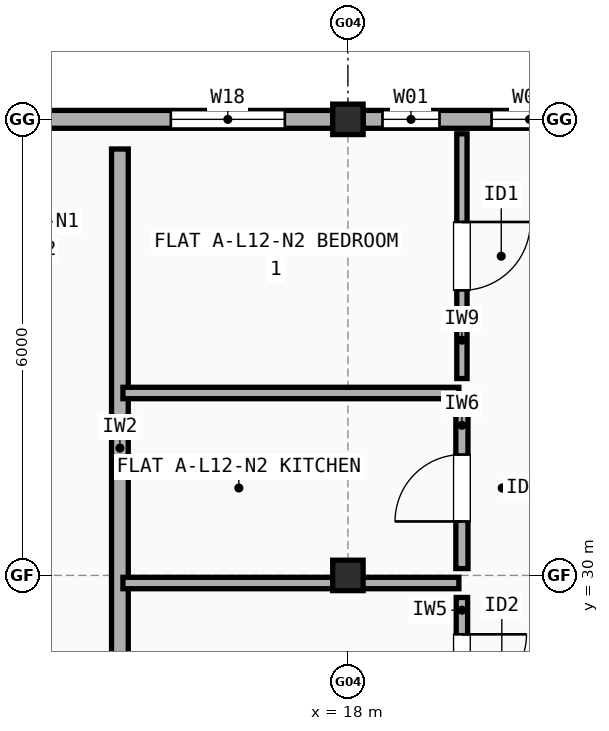
"""IFC4 building model, lengths in metres.
Left out: names, types, materials, properties, quantities, classifications, styles, units other than length and angle.
Written with IfcOpenShell. Run it as: python <this file> out.ifc"""

import sys

from ifc_helpers import new_model, si_unit, direction, frame, frame_2d, origin, origin_2d, place, context, subcontext, project, spatial, rectangle, extrude, element, fill, save


model = new_model("IFC4")
c1 = context("Model", 3, precision=1e-05, world=origin(), true_north=direction((0.0, 1.0)))
c2 = subcontext(c1, "Body", "Model", "MODEL_VIEW")
j1 = project(units=[si_unit("LENGTHUNIT", "METRE"), si_unit("PLANEANGLEUNIT", "RADIAN")], contexts=[c1])
p1 = place(None, origin())
s1 = spatial("IfcSite", under=j1, at=p1, CompositionType="ELEMENT")
p2 = place(p1, origin())
s2 = spatial("IfcBuilding", under=s1, at=p2, CompositionType="ELEMENT")
p3 = place(p2, frame((0.0, 0.0, 39.7)))
s3 = spatial("IfcBuildingStorey", under=s2, at=p3, CompositionType="ELEMENT", Elevation=39.7)
for number, where, z_axis, x_axis in (
    (1, (18.0, 30.0, 0.0), (0.0, 0.0, 1.0), (1.0, 0.0, 0.0)),
    (2, (18.0, 36.0, 0.0), (0.0, 0.0, 1.0), (1.0, 0.0, 0.0)),
):
    element("IfcColumn", number, at=place(p3, frame(where, z_axis=z_axis, x_axis=x_axis)), inside=s3, PredefinedType="COLUMN", context=c2, shape_type="SweptSolid", body=[
        extrude(rectangle(XDim=0.4, YDim=0.4, at=origin_2d()), origin(), (0.0, 0.0, 1.0), 3.0),
    ])
p4 = place(p3, frame((23.8, 36.0, 0.0), z_axis=(0.0, 0.0, 1.0), x_axis=(-1.0, 0.0, 0.0)))
e3 = element("IfcWall", 3, at=p4, inside=s3, PredefinedType="STANDARD", context=c2, shape_type="SweptSolid", body=[
    extrude(rectangle(XDim=5.6, YDim=0.235, at=frame_2d((2.8, 0.0))), origin(), (0.0, 0.0, 1.0), 2.482),
])
p5 = place(p4, frame((0.35, 0.0, 0.9)))
e4 = element("IfcOpeningElement", 4, at=p5, cuts=e3, PredefinedType="OPENING", context=c2, shape_type="SweptSolid", body=[
    extrude(rectangle(XDim=1.0, YDim=1.4, at=frame_2d((0.5, 0.7))), frame((0.0, 0.127, 0.0), z_axis=(0.0, -1.0, 0.0), x_axis=(1.0, 0.0, 0.0)), (0.0, 0.0, 1.0), 0.255),
])
p6 = place(p4, frame((2.91, 0.0, 0.9)))
e5 = element("IfcOpeningElement", 5, at=p6, cuts=e3, PredefinedType="OPENING", context=c2, shape_type="SweptSolid", body=[
    extrude(rectangle(XDim=1.0, YDim=1.4, at=frame_2d((0.5, 0.7))), frame((0.0, 0.127, 0.0), z_axis=(0.0, -1.0, 0.0), x_axis=(1.0, 0.0, 0.0)), (0.0, 0.0, 1.0), 0.255),
])
p7 = place(p4, frame((4.595, 0.0, 0.9)))
e6 = element("IfcOpeningElement", 6, at=p7, cuts=e3, PredefinedType="OPENING", context=c2, shape_type="SweptSolid", body=[
    extrude(rectangle(XDim=0.75, YDim=1.15, at=frame_2d((0.375, 0.575))), frame((0.0, 0.127, 0.0), z_axis=(0.0, -1.0, 0.0), x_axis=(1.0, 0.0, 0.0)), (0.0, 0.0, 1.0), 0.255),
])
p8 = place(p3, frame((17.8, 36.0, 0.0), z_axis=(0.0, 0.0, 1.0), x_axis=(-1.0, 0.0, 0.0)))
e7 = element("IfcWall", 7, at=p8, inside=s3, PredefinedType="STANDARD", context=c2, shape_type="SweptSolid", body=[
    extrude(rectangle(XDim=5.6, YDim=0.235, at=frame_2d((2.8, 0.0))), origin(), (0.0, 0.0, 1.0), 2.482),
])
p9 = place(p8, frame((0.63, 0.0, 0.9)))
e8 = element("IfcOpeningElement", 8, at=p9, cuts=e7, PredefinedType="OPENING", context=c2, shape_type="SweptSolid", body=[
    extrude(rectangle(XDim=1.5, YDim=1.4, at=frame_2d((0.75, 0.7))), frame((0.0, 0.127, 0.0), z_axis=(0.0, -1.0, 0.0), x_axis=(1.0, 0.0, 0.0)), (0.0, 0.0, 1.0), 0.255),
])
p10 = place(p8, frame((3.77, 0.0, 0.9)))
e9 = element("IfcOpeningElement", 9, at=p10, cuts=e7, PredefinedType="OPENING", context=c2, shape_type="SweptSolid", body=[
    extrude(rectangle(XDim=0.9, YDim=1.4, at=frame_2d((0.45, 0.7))), frame((0.0, 0.127, 0.0), z_axis=(0.0, -1.0, 0.0), x_axis=(1.0, 0.0, 0.0)), (0.0, 0.0, 1.0), 0.255),
])
p11 = place(p3, frame((15.0, 27.74, 0.0), z_axis=(0.0, 0.0, 1.0), x_axis=(0.0, 1.0, 0.0)))
e10 = element("IfcWall", 10, at=p11, inside=s3, PredefinedType="SOLIDWALL", context=c2, shape_type="SweptSolid", body=[
    extrude(rectangle(XDim=7.87, YDim=0.22, at=frame_2d((3.935, 0.0))), origin(), (0.0, 0.0, 1.0), 2.532),
])
p12 = place(p3, frame((19.5, 32.59, 0.0), z_axis=(0.0, 0.0, 1.0), x_axis=(0.0, 1.0, 0.0)))
e11 = element("IfcWall", 11, at=p12, inside=s3, PredefinedType="PARTITIONING", context=c2, shape_type="SweptSolid", body=[
    extrude(rectangle(XDim=3.22, YDim=0.135, at=frame_2d((1.61, 0.0))), origin(), (0.0, 0.0, 1.0), 3.0),
])
p13 = place(p12, frame((1.16, 0.0, 0.0)))
e12 = element("IfcOpeningElement", 12, at=p13, cuts=e11, PredefinedType="OPENING", context=c2, shape_type="SweptSolid", body=[
    extrude(rectangle(XDim=0.9, YDim=2.1, at=frame_2d((0.45, 1.05))), frame((0.0, 0.077, 0.0), z_axis=(0.0, -1.0, 0.0), x_axis=(1.0, 0.0, 0.0)), (0.0, 0.0, 1.0), 0.155),
])
p14 = place(p3, frame((19.5, 30.09, 0.0), z_axis=(0.0, 0.0, 1.0), x_axis=(0.0, 1.0, 0.0)))
e13 = element("IfcWall", 13, at=p14, inside=s3, PredefinedType="PLUMBINGWALL", context=c2, shape_type="SweptSolid", body=[
    extrude(rectangle(XDim=2.12, YDim=0.16, at=frame_2d((1.06, 0.0))), origin(), (0.0, 0.0, 1.0), 2.532),
])
p15 = place(p14, frame((0.62, 0.0, 0.0)))
e14 = element("IfcOpeningElement", 14, at=p15, cuts=e13, PredefinedType="OPENING", context=c2, shape_type="SweptSolid", body=[
    extrude(rectangle(XDim=0.88, YDim=2.1, at=frame_2d((0.44, 1.05))), frame((0.0, 0.09, 0.0), z_axis=(0.0, -1.0, 0.0), x_axis=(1.0, 0.0, 0.0)), (0.0, 0.0, 1.0), 0.18),
])
p16 = place(p3, frame((19.5, 27.89, 0.0), z_axis=(0.0, 0.0, 1.0), x_axis=(0.0, 1.0, 0.0)))
e15 = element("IfcWall", 15, at=p16, inside=s3, PredefinedType="PARTITIONING", context=c2, shape_type="SweptSolid", body=[
    extrude(rectangle(XDim=1.82, YDim=0.15, at=frame_2d((0.91, 0.0))), origin(), (0.0, 0.0, 1.0), 3.0),
])
p17 = place(p16, frame((0.485, 0.0, 0.0)))
e16 = element("IfcOpeningElement", 16, at=p17, cuts=e15, PredefinedType="OPENING", context=c2, shape_type="SweptSolid", body=[
    extrude(rectangle(XDim=0.85, YDim=2.1, at=frame_2d((0.425, 1.05))), frame((0.0, 0.085, 0.0), z_axis=(0.0, -1.0, 0.0), x_axis=(1.0, 0.0, 0.0)), (0.0, 0.0, 1.0), 0.17),
])
p18 = place(p3, frame((15.04, 32.4, 0.0), z_axis=(0.0, 0.0, 1.0), x_axis=(1.0, 0.0, 0.0)))
e17 = element("IfcWall", 17, at=p18, inside=s3, PredefinedType="PARTITIONING", context=c2, shape_type="SweptSolid", body=[
    extrude(rectangle(XDim=4.42, YDim=0.15, at=frame_2d((2.21, 0.0))), origin(), (0.0, 0.0, 1.0), 2.508),
])
p19 = place(p3, frame((15.04, 29.9, 0.0), z_axis=(0.0, 0.0, 1.0), x_axis=(1.0, 0.0, 0.0)))
e18 = element("IfcWall", 18, at=p19, inside=s3, PredefinedType="PARTITIONING", context=c2, shape_type="SweptSolid", body=[
    extrude(rectangle(XDim=4.42, YDim=0.15, at=frame_2d((2.21, 0.0))), origin(), (0.0, 0.0, 1.0), 2.532),
])
p20 = place(p6, origin())
e19 = element("IfcWindow", 19, at=p20, inside=s3, PartitioningType="SINGLE_PANEL", PredefinedType="WINDOW", context=c2, shape_type="SweptSolid", body=[
    extrude(rectangle(XDim=1.0, YDim=1.4, at=frame_2d((0.5, 0.7))), frame((0.0, 0.03, 0.0), z_axis=(0.0, -1.0, 0.0), x_axis=(1.0, 0.0, 0.0)), (0.0, 0.0, 1.0), 0.06),
])
fill(e5, e19)
p21 = place(p7, origin())
e20 = element("IfcWindow", 20, at=p21, inside=s3, PartitioningType="SINGLE_PANEL", PredefinedType="WINDOW", context=c2, shape_type="SweptSolid", body=[
    extrude(rectangle(XDim=0.75, YDim=1.15, at=frame_2d((0.375, 0.575))), frame((0.0, 0.03, 0.0), z_axis=(0.0, -1.0, 0.0), x_axis=(1.0, 0.0, 0.0)), (0.0, 0.0, 1.0), 0.06),
])
fill(e6, e20)
p22 = place(p9, origin())
e21 = element("IfcWindow", 21, at=p22, inside=s3, PartitioningType="SINGLE_PANEL", PredefinedType="WINDOW", context=c2, shape_type="SweptSolid", body=[
    extrude(rectangle(XDim=1.5, YDim=1.4, at=frame_2d((0.75, 0.7))), frame((0.0, 0.03, 0.0), z_axis=(0.0, -1.0, 0.0), x_axis=(1.0, 0.0, 0.0)), (0.0, 0.0, 1.0), 0.06),
])
fill(e8, e21)
p23 = place(p13, origin())
e22 = element("IfcDoor", 22, at=p23, inside=s3, OperationType="SINGLE_SWING_RIGHT", PredefinedType="DOOR", context=c2, shape_type="SweptSolid", body=[
    extrude(rectangle(XDim=0.9, YDim=2.1, at=frame_2d((0.45, 1.05))), frame((0.0, 0.025, 0.0), z_axis=(0.0, -1.0, 0.0), x_axis=(1.0, 0.0, 0.0)), (0.0, 0.0, 1.0), 0.05),
])
fill(e12, e22)
p24 = place(p15, origin())
e23 = element("IfcDoor", 23, at=p24, inside=s3, OperationType="SINGLE_SWING_LEFT", PredefinedType="DOOR", context=c2, shape_type="SweptSolid", body=[
    extrude(rectangle(XDim=0.88, YDim=2.1, at=frame_2d((0.44, 1.05))), frame((0.0, 0.025, 0.0), z_axis=(0.0, -1.0, 0.0), x_axis=(1.0, 0.0, 0.0)), (0.0, 0.0, 1.0), 0.05),
])
fill(e14, e23)
p25 = place(p17, origin())
e24 = element("IfcDoor", 24, at=p25, inside=s3, OperationType="SINGLE_SWING_RIGHT", PredefinedType="DOOR", context=c2, shape_type="SweptSolid", body=[
    extrude(rectangle(XDim=0.85, YDim=2.1, at=frame_2d((0.425, 1.05))), frame((0.0, 0.025, 0.0), z_axis=(0.0, -1.0, 0.0), x_axis=(1.0, 0.0, 0.0)), (0.0, 0.0, 1.0), 0.05),
])
fill(e16, e24)
save(model, sys.argv[1])
